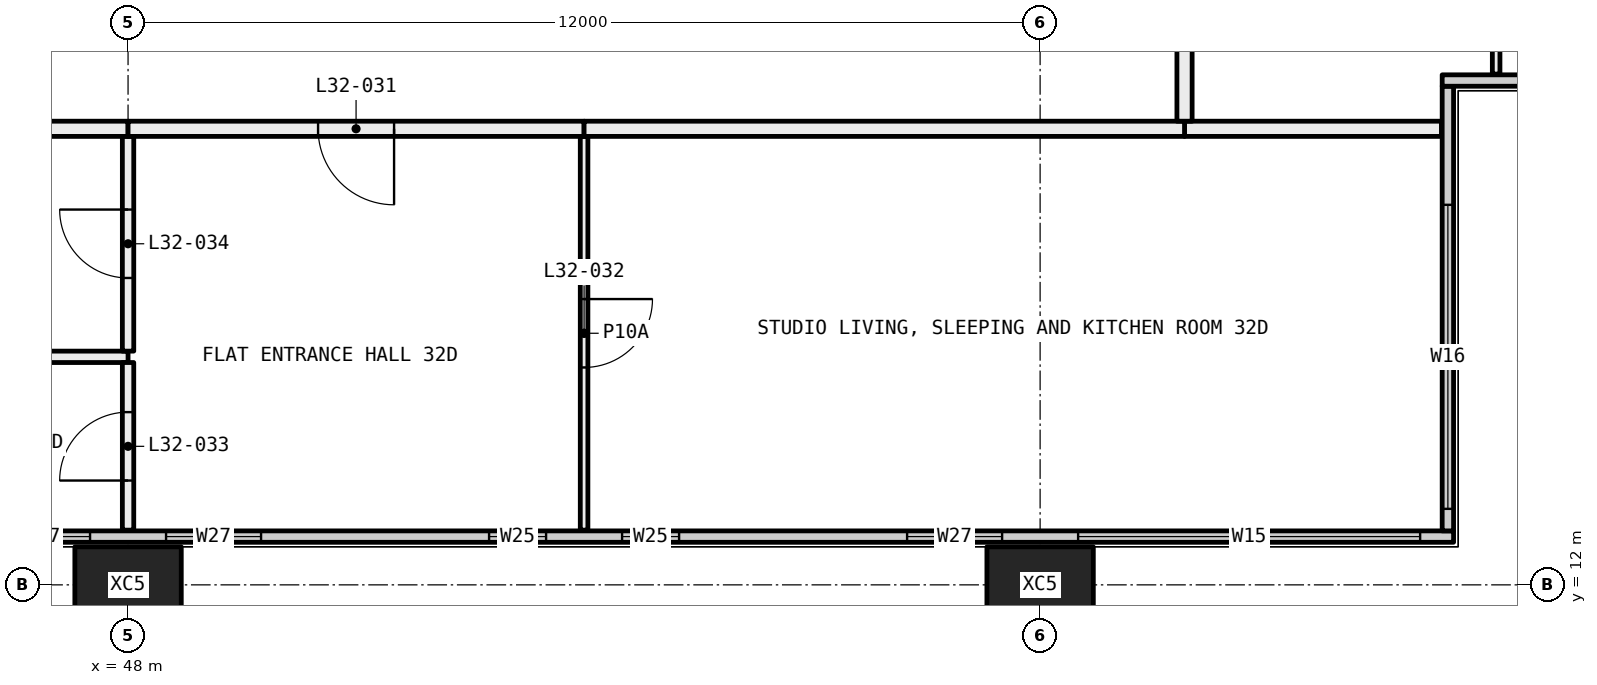
"""IFC4 building model, lengths in metres.
Left out: names, types, materials, properties, quantities, classifications, styles, units other than length and angle.
Written with IfcOpenShell. Run it as: python <this file> out.ifc"""

import sys

from ifc_helpers import new_model, si_unit, direction, frame, frame_2d, origin, origin_2d, place, context, subcontext, project, spatial, rectangle, hollow_rectangle, extrude, element, fill, save


model = new_model("IFC4")
c1 = context("Model", 3, precision=1e-05, world=origin(), true_north=direction((0.0, 1.0)))
c2 = subcontext(c1, "Body", "Model", "MODEL_VIEW")
j1 = project(units=[si_unit("LENGTHUNIT", "METRE"), si_unit("PLANEANGLEUNIT", "RADIAN")], contexts=[c1])
p1 = place(None, origin())
s1 = spatial("IfcSite", under=j1, at=p1, CompositionType="ELEMENT")
p2 = place(p1, origin())
s2 = spatial("IfcBuilding", under=s1, at=p2, CompositionType="ELEMENT")
p3 = place(p2, frame((0.0, 0.0, 124.2)))
s3 = spatial("IfcBuildingStorey", under=s2, at=p3, CompositionType="ELEMENT", Elevation=124.2)
for number, where, z_axis, x_axis in (
    (1, (48.0, 12.0, -0.4), (0.0, 0.0, 1.0), (1.0, 0.0, 0.0)),
    (2, (60.0, 12.0, -0.4), (0.0, 0.0, 1.0), (1.0, 0.0, 0.0)),
):
    element("IfcColumn", number, at=place(p3, frame(where, z_axis=z_axis, x_axis=x_axis)), inside=s3, PredefinedType="COLUMN", context=c2, shape_type="SweptSolid", body=[
        extrude(hollow_rectangle(XDim=1.4, YDim=1.0, WallThickness=0.055, at=origin_2d()), origin(), (0.0, 0.0, 1.0), 3.45),
    ])
p4 = place(p3, frame((6.56, 12.635, 0.0), z_axis=(0.0, 0.0, 1.0), x_axis=(1.0, 0.0, 0.0)))
e3 = element("IfcWall", 3, at=p4, inside=s3, PredefinedType="ELEMENTEDWALL", context=c2, shape_type="SweptSolid", body=[
    extrude(rectangle(XDim=58.88, YDim=0.15, at=frame_2d((29.44, 0.0))), origin(), (0.0, 0.0, 1.0), 3.05),
])
p5 = place(p4, frame((0.44, 0.0, 0.45)))
e4 = element("IfcOpeningElement", 4, at=p5, cuts=e3, PredefinedType="OPENING", context=c2, shape_type="SweptSolid", body=[
    extrude(rectangle(XDim=4.5, YDim=2.55, at=frame_2d((2.25, 1.275))), frame((0.0, 0.085, 0.0), z_axis=(0.0, -1.0, 0.0), x_axis=(1.0, 0.0, 0.0)), (0.0, 0.0, 1.0), 0.17),
])
p6 = place(p4, frame((5.94, 0.0, 0.45)))
e5 = element("IfcOpeningElement", 5, at=p6, cuts=e3, PredefinedType="OPENING", context=c2, shape_type="SweptSolid", body=[
    extrude(rectangle(XDim=1.25, YDim=2.55, at=frame_2d((0.625, 1.275))), frame((0.0, 0.085, 0.0), z_axis=(0.0, -1.0, 0.0), x_axis=(1.0, 0.0, 0.0)), (0.0, 0.0, 1.0), 0.17),
])
p7 = place(p4, frame((10.19, 0.0, 0.45)))
e6 = element("IfcOpeningElement", 6, at=p7, cuts=e3, PredefinedType="OPENING", context=c2, shape_type="SweptSolid", body=[
    extrude(rectangle(XDim=0.75, YDim=2.55, at=frame_2d((0.375, 1.275))), frame((0.0, 0.085, 0.0), z_axis=(0.0, -1.0, 0.0), x_axis=(1.0, 0.0, 0.0)), (0.0, 0.0, 1.0), 0.17),
])
p8 = place(p4, frame((11.94, 0.0, 0.45)))
e7 = element("IfcOpeningElement", 7, at=p8, cuts=e3, PredefinedType="OPENING", context=c2, shape_type="SweptSolid", body=[
    extrude(rectangle(XDim=0.75, YDim=2.55, at=frame_2d((0.375, 1.275))), frame((0.0, 0.085, 0.0), z_axis=(0.0, -1.0, 0.0), x_axis=(1.0, 0.0, 0.0)), (0.0, 0.0, 1.0), 0.17),
])
p9 = place(p4, frame((15.69, 0.0, 0.45)))
e8 = element("IfcOpeningElement", 8, at=p9, cuts=e3, PredefinedType="OPENING", context=c2, shape_type="SweptSolid", body=[
    extrude(rectangle(XDim=1.25, YDim=2.55, at=frame_2d((0.625, 1.275))), frame((0.0, 0.085, 0.0), z_axis=(0.0, -1.0, 0.0), x_axis=(1.0, 0.0, 0.0)), (0.0, 0.0, 1.0), 0.17),
])
p10 = place(p4, frame((17.94, 0.0, 0.45)))
e9 = element("IfcOpeningElement", 9, at=p10, cuts=e3, PredefinedType="OPENING", context=c2, shape_type="SweptSolid", body=[
    extrude(rectangle(XDim=1.25, YDim=2.55, at=frame_2d((0.625, 1.275))), frame((0.0, 0.085, 0.0), z_axis=(0.0, -1.0, 0.0), x_axis=(1.0, 0.0, 0.0)), (0.0, 0.0, 1.0), 0.17),
])
p11 = place(p4, frame((22.19, 0.0, 0.45)))
e10 = element("IfcOpeningElement", 10, at=p11, cuts=e3, PredefinedType="OPENING", context=c2, shape_type="SweptSolid", body=[
    extrude(rectangle(XDim=0.75, YDim=2.55, at=frame_2d((0.375, 1.275))), frame((0.0, 0.085, 0.0), z_axis=(0.0, -1.0, 0.0), x_axis=(1.0, 0.0, 0.0)), (0.0, 0.0, 1.0), 0.17),
])
p12 = place(p4, frame((23.94, 0.0, 0.45)))
e11 = element("IfcOpeningElement", 11, at=p12, cuts=e3, PredefinedType="OPENING", context=c2, shape_type="SweptSolid", body=[
    extrude(rectangle(XDim=0.75, YDim=2.55, at=frame_2d((0.375, 1.275))), frame((0.0, 0.085, 0.0), z_axis=(0.0, -1.0, 0.0), x_axis=(1.0, 0.0, 0.0)), (0.0, 0.0, 1.0), 0.17),
])
p13 = place(p4, frame((27.69, 0.0, 0.45)))
e12 = element("IfcOpeningElement", 12, at=p13, cuts=e3, PredefinedType="OPENING", context=c2, shape_type="SweptSolid", body=[
    extrude(rectangle(XDim=1.25, YDim=2.55, at=frame_2d((0.625, 1.275))), frame((0.0, 0.085, 0.0), z_axis=(0.0, -1.0, 0.0), x_axis=(1.0, 0.0, 0.0)), (0.0, 0.0, 1.0), 0.17),
])
p14 = place(p4, frame((29.94, 0.0, 0.45)))
e13 = element("IfcOpeningElement", 13, at=p14, cuts=e3, PredefinedType="OPENING", context=c2, shape_type="SweptSolid", body=[
    extrude(rectangle(XDim=1.25, YDim=2.55, at=frame_2d((0.625, 1.275))), frame((0.0, 0.085, 0.0), z_axis=(0.0, -1.0, 0.0), x_axis=(1.0, 0.0, 0.0)), (0.0, 0.0, 1.0), 0.17),
])
p15 = place(p4, frame((34.19, 0.0, 0.45)))
e14 = element("IfcOpeningElement", 14, at=p15, cuts=e3, PredefinedType="OPENING", context=c2, shape_type="SweptSolid", body=[
    extrude(rectangle(XDim=0.75, YDim=2.55, at=frame_2d((0.375, 1.275))), frame((0.0, 0.085, 0.0), z_axis=(0.0, -1.0, 0.0), x_axis=(1.0, 0.0, 0.0)), (0.0, 0.0, 1.0), 0.17),
])
p16 = place(p4, frame((35.94, 0.0, 0.45)))
e15 = element("IfcOpeningElement", 15, at=p16, cuts=e3, PredefinedType="OPENING", context=c2, shape_type="SweptSolid", body=[
    extrude(rectangle(XDim=0.75, YDim=2.55, at=frame_2d((0.375, 1.275))), frame((0.0, 0.085, 0.0), z_axis=(0.0, -1.0, 0.0), x_axis=(1.0, 0.0, 0.0)), (0.0, 0.0, 1.0), 0.17),
])
p17 = place(p4, frame((39.69, 0.0, 0.45)))
e16 = element("IfcOpeningElement", 16, at=p17, cuts=e3, PredefinedType="OPENING", context=c2, shape_type="SweptSolid", body=[
    extrude(rectangle(XDim=1.25, YDim=2.55, at=frame_2d((0.625, 1.275))), frame((0.0, 0.085, 0.0), z_axis=(0.0, -1.0, 0.0), x_axis=(1.0, 0.0, 0.0)), (0.0, 0.0, 1.0), 0.17),
])
p18 = place(p4, frame((41.94, 0.0, 0.45)))
e17 = element("IfcOpeningElement", 17, at=p18, cuts=e3, PredefinedType="OPENING", context=c2, shape_type="SweptSolid", body=[
    extrude(rectangle(XDim=1.25, YDim=2.55, at=frame_2d((0.625, 1.275))), frame((0.0, 0.085, 0.0), z_axis=(0.0, -1.0, 0.0), x_axis=(1.0, 0.0, 0.0)), (0.0, 0.0, 1.0), 0.17),
])
p19 = place(p4, frame((46.19, 0.0, 0.45)))
e18 = element("IfcOpeningElement", 18, at=p19, cuts=e3, PredefinedType="OPENING", context=c2, shape_type="SweptSolid", body=[
    extrude(rectangle(XDim=0.75, YDim=2.55, at=frame_2d((0.375, 1.275))), frame((0.0, 0.085, 0.0), z_axis=(0.0, -1.0, 0.0), x_axis=(1.0, 0.0, 0.0)), (0.0, 0.0, 1.0), 0.17),
])
p20 = place(p4, frame((47.94, 0.0, 0.45)))
e19 = element("IfcOpeningElement", 19, at=p20, cuts=e3, PredefinedType="OPENING", context=c2, shape_type="SweptSolid", body=[
    extrude(rectangle(XDim=0.75, YDim=2.55, at=frame_2d((0.375, 1.275))), frame((0.0, 0.085, 0.0), z_axis=(0.0, -1.0, 0.0), x_axis=(1.0, 0.0, 0.0)), (0.0, 0.0, 1.0), 0.17),
])
p21 = place(p4, frame((51.69, 0.0, 0.45)))
e20 = element("IfcOpeningElement", 20, at=p21, cuts=e3, PredefinedType="OPENING", context=c2, shape_type="SweptSolid", body=[
    extrude(rectangle(XDim=1.25, YDim=2.55, at=frame_2d((0.625, 1.275))), frame((0.0, 0.085, 0.0), z_axis=(0.0, -1.0, 0.0), x_axis=(1.0, 0.0, 0.0)), (0.0, 0.0, 1.0), 0.17),
])
p22 = place(p4, frame((53.94, 0.0, 0.45)))
e21 = element("IfcOpeningElement", 21, at=p22, cuts=e3, PredefinedType="OPENING", context=c2, shape_type="SweptSolid", body=[
    extrude(rectangle(XDim=4.5, YDim=2.55, at=frame_2d((2.25, 1.275))), frame((0.0, 0.085, 0.0), z_axis=(0.0, -1.0, 0.0), x_axis=(1.0, 0.0, 0.0)), (0.0, 0.0, 1.0), 0.17),
])
p23 = place(p3, frame((65.365, 12.71, 0.0), z_axis=(0.0, 0.0, 1.0), x_axis=(0.0, 1.0, 0.0)))
e22 = element("IfcWall", 22, at=p23, inside=s3, PredefinedType="ELEMENTEDWALL", context=c2, shape_type="SweptSolid", body=[
    extrude(rectangle(XDim=5.85, YDim=0.15, at=frame_2d((2.925, 0.0))), origin(), (0.0, 0.0, 1.0), 3.05),
])
p24 = place(p23, frame((0.29, 0.0, 0.45)))
e23 = element("IfcOpeningElement", 23, at=p24, cuts=e22, PredefinedType="OPENING", context=c2, shape_type="SweptSolid", body=[
    extrude(rectangle(XDim=4.0, YDim=2.55, at=frame_2d((2.0, 1.275))), frame((0.0, 0.085, 0.0), z_axis=(0.0, -1.0, 0.0), x_axis=(1.0, 0.0, 0.0)), (0.0, 0.0, 1.0), 0.17),
])
p25 = place(p3, frame((65.29, 18.635, 0.0), z_axis=(0.0, 0.0, 1.0), x_axis=(1.0, 0.0, 0.0)))
e24 = element("IfcWall", 24, at=p25, inside=s3, PredefinedType="ELEMENTEDWALL", context=c2, shape_type="SweptSolid", body=[
    extrude(rectangle(XDim=6.15, YDim=0.15, at=frame_2d((3.075, 0.0))), origin(), (0.0, 0.0, 1.0), 3.05),
])
p26 = place(p25, frame((1.71, 0.0, 0.45)))
e25 = element("IfcOpeningElement", 25, at=p26, cuts=e24, PredefinedType="OPENING", context=c2, shape_type="SweptSolid", body=[
    extrude(rectangle(XDim=4.0, YDim=2.55, at=frame_2d((2.0, 1.275))), frame((0.0, 0.085, 0.0), z_axis=(0.0, -1.0, 0.0), x_axis=(1.0, 0.0, 0.0)), (0.0, 0.0, 1.0), 0.17),
])
p27 = place(p3, frame((48.0, 15.0, 0.0), z_axis=(0.0, 0.0, 1.0), x_axis=(-1.0, 0.0, 0.0)))
e26 = element("IfcWall", 26, at=p27, inside=s3, PredefinedType="PARTITIONING", context=c2, shape_type="SweptSolid", body=[
    extrude(rectangle(XDim=5.9, YDim=0.15, at=frame_2d((2.95, 0.0))), origin(), (0.0, 0.0, 1.0), 3.05),
])
p28 = place(p3, frame((48.0, 12.72, 0.0), z_axis=(0.0, 0.0, 1.0), x_axis=(0.0, 1.0, 0.0)))
e27 = element("IfcWall", 27, at=p28, inside=s3, PredefinedType="PARTITIONING", context=c2, shape_type="SweptSolid", body=[
    extrude(rectangle(XDim=2.205, YDim=0.15, at=frame_2d((1.103, 0.0))), origin(), (0.0, 0.0, 1.0), 3.05),
])
p29 = place(p28, frame((0.653, 0.0, 0.0)))
e28 = element("IfcOpeningElement", 28, at=p29, cuts=e27, PredefinedType="OPENING", context=c2, shape_type="SweptSolid", body=[
    extrude(rectangle(XDim=0.9, YDim=2.1, at=frame_2d((0.45, 1.05))), frame((0.0, 0.085, 0.0), z_axis=(0.0, -1.0, 0.0), x_axis=(1.0, 0.0, 0.0)), (0.0, 0.0, 1.0), 0.17),
])
p30 = place(p3, frame((48.0, 15.075, 0.0), z_axis=(0.0, 0.0, 1.0), x_axis=(0.0, 1.0, 0.0)))
e29 = element("IfcWall", 29, at=p30, inside=s3, PredefinedType="PARTITIONING", context=c2, shape_type="SweptSolid", body=[
    extrude(rectangle(XDim=2.825, YDim=0.15, at=frame_2d((1.413, 0.0))), origin(), (0.0, 0.0, 1.0), 3.05),
])
p31 = place(p30, frame((0.962, 0.0, 0.0)))
e30 = element("IfcOpeningElement", 30, at=p31, cuts=e29, PredefinedType="OPENING", context=c2, shape_type="SweptSolid", body=[
    extrude(rectangle(XDim=0.9, YDim=2.1, at=frame_2d((0.45, 1.05))), frame((0.0, 0.085, 0.0), z_axis=(0.0, -1.0, 0.0), x_axis=(1.0, 0.0, 0.0)), (0.0, 0.0, 1.0), 0.17),
])
p32 = place(p3, frame((48.0, 18.0, 0.0), z_axis=(0.0, 0.0, 1.0), x_axis=(-1.0, 0.0, 0.0)))
e31 = element("IfcWall", 31, at=p32, inside=s3, PredefinedType="PARTITIONING", context=c2, shape_type="SweptSolid", body=[
    extrude(rectangle(XDim=1.9, YDim=0.2, at=frame_2d((0.95, 0.0))), origin(), (0.0, 0.0, 1.0), 3.05),
])
p33 = place(p3, frame((54.0, 12.72, 0.0), z_axis=(0.0, 0.0, 1.0), x_axis=(0.0, 1.0, 0.0)))
e32 = element("IfcWall", 32, at=p33, inside=s3, PredefinedType="PARTITIONING", context=c2, shape_type="SweptSolid", body=[
    extrude(rectangle(XDim=5.18, YDim=0.1, at=frame_2d((2.59, 0.0))), origin(), (0.0, 0.0, 1.0), 3.05),
])
p34 = place(p33, frame((2.14, 0.0, 0.0)))
e33 = element("IfcOpeningElement", 33, at=p34, cuts=e32, PredefinedType="OPENING", context=c2, shape_type="SweptSolid", body=[
    extrude(rectangle(XDim=0.9, YDim=2.1, at=frame_2d((0.45, 1.05))), frame((0.0, 0.06, 0.0), z_axis=(0.0, -1.0, 0.0), x_axis=(1.0, 0.0, 0.0)), (0.0, 0.0, 1.0), 0.12),
])
p35 = place(p3, frame((54.0, 18.0, 0.0), z_axis=(0.0, 0.0, 1.0), x_axis=(-1.0, 0.0, 0.0)))
e34 = element("IfcWall", 34, at=p35, inside=s3, PredefinedType="PARTITIONING", context=c2, shape_type="SweptSolid", body=[
    extrude(rectangle(XDim=6.0, YDim=0.2, at=frame_2d((3.0, 0.0))), origin(), (0.0, 0.0, 1.0), 3.05),
])
p36 = place(p35, frame((2.5, 0.0, 0.0)))
e35 = element("IfcOpeningElement", 35, at=p36, cuts=e34, PredefinedType="OPENING", context=c2, shape_type="SweptSolid", body=[
    extrude(rectangle(XDim=1.0, YDim=2.1, at=frame_2d((0.5, 1.05))), frame((0.0, 0.11, 0.0), z_axis=(0.0, -1.0, 0.0), x_axis=(1.0, 0.0, 0.0)), (0.0, 0.0, 1.0), 0.22),
])
p37 = place(p3, frame((65.28, 18.0, 0.0), z_axis=(0.0, 0.0, 1.0), x_axis=(-1.0, 0.0, 0.0)))
e36 = element("IfcWall", 36, at=p37, inside=s3, PredefinedType="PARTITIONING", context=c2, shape_type="SweptSolid", body=[
    extrude(rectangle(XDim=3.38, YDim=0.2, at=frame_2d((1.69, 0.0))), origin(), (0.0, 0.0, 1.0), 3.05),
])
p38 = place(p3, frame((61.9, 18.0, 0.0), z_axis=(0.0, 0.0, 1.0), x_axis=(-1.0, 0.0, 0.0)))
e37 = element("IfcWall", 37, at=p38, inside=s3, PredefinedType="PARTITIONING", context=c2, shape_type="SweptSolid", body=[
    extrude(rectangle(XDim=7.9, YDim=0.2, at=frame_2d((3.95, 0.0))), origin(), (0.0, 0.0, 1.0), 3.05),
])
p39 = place(p3, frame((66.0, 22.5, 0.0), z_axis=(0.0, 0.0, 1.0), x_axis=(0.0, -1.0, 0.0)))
e38 = element("IfcWall", 38, at=p39, inside=s3, PredefinedType="PARTITIONING", context=c2, shape_type="SweptSolid", body=[
    extrude(rectangle(XDim=3.78, YDim=0.1, at=frame_2d((1.89, 0.0))), origin(), (0.0, 0.0, 1.0), 3.05),
])
p40 = place(p3, frame((61.9, 22.5, 0.0), z_axis=(0.0, 0.0, 1.0), x_axis=(0.0, -1.0, 0.0)))
e39 = element("IfcWall", 39, at=p40, inside=s3, PredefinedType="PARTITIONING", context=c2, shape_type="SweptSolid", body=[
    extrude(rectangle(XDim=4.4, YDim=0.2, at=frame_2d((2.2, 0.0))), origin(), (0.0, 0.0, 1.0), 3.05),
])
p41 = place(p17, origin())
e40 = element("IfcWindow", 40, at=p41, inside=s3, PartitioningType="SINGLE_PANEL", PredefinedType="WINDOW", context=c2, shape_type="SweptSolid", body=[
    extrude(rectangle(XDim=1.25, YDim=2.55, at=frame_2d((0.625, 1.275))), frame((0.0, 0.03, 0.0), z_axis=(0.0, -1.0, 0.0), x_axis=(1.0, 0.0, 0.0)), (0.0, 0.0, 1.0), 0.06),
])
fill(e16, e40)
p42 = place(p18, origin())
e41 = element("IfcWindow", 41, at=p42, inside=s3, PartitioningType="SINGLE_PANEL", PredefinedType="WINDOW", context=c2, shape_type="SweptSolid", body=[
    extrude(rectangle(XDim=1.25, YDim=2.55, at=frame_2d((0.625, 1.275))), frame((0.0, 0.03, 0.0), z_axis=(0.0, -1.0, 0.0), x_axis=(1.0, 0.0, 0.0)), (0.0, 0.0, 1.0), 0.06),
])
fill(e17, e41)
p43 = place(p19, origin())
e42 = element("IfcWindow", 42, at=p43, inside=s3, PartitioningType="SINGLE_PANEL", PredefinedType="WINDOW", context=c2, shape_type="SweptSolid", body=[
    extrude(rectangle(XDim=0.75, YDim=2.55, at=frame_2d((0.375, 1.275))), frame((0.0, 0.03, 0.0), z_axis=(0.0, -1.0, 0.0), x_axis=(1.0, 0.0, 0.0)), (0.0, 0.0, 1.0), 0.06),
])
fill(e18, e42)
p44 = place(p20, origin())
e43 = element("IfcWindow", 43, at=p44, inside=s3, PartitioningType="SINGLE_PANEL", PredefinedType="WINDOW", context=c2, shape_type="SweptSolid", body=[
    extrude(rectangle(XDim=0.75, YDim=2.55, at=frame_2d((0.375, 1.275))), frame((0.0, 0.03, 0.0), z_axis=(0.0, -1.0, 0.0), x_axis=(1.0, 0.0, 0.0)), (0.0, 0.0, 1.0), 0.06),
])
fill(e19, e43)
p45 = place(p21, origin())
e44 = element("IfcWindow", 44, at=p45, inside=s3, PartitioningType="SINGLE_PANEL", PredefinedType="WINDOW", context=c2, shape_type="SweptSolid", body=[
    extrude(rectangle(XDim=1.25, YDim=2.55, at=frame_2d((0.625, 1.275))), frame((0.0, 0.03, 0.0), z_axis=(0.0, -1.0, 0.0), x_axis=(1.0, 0.0, 0.0)), (0.0, 0.0, 1.0), 0.06),
])
fill(e20, e44)
p46 = place(p22, origin())
e45 = element("IfcWindow", 45, at=p46, inside=s3, PartitioningType="SINGLE_PANEL", PredefinedType="WINDOW", context=c2, shape_type="SweptSolid", body=[
    extrude(rectangle(XDim=4.5, YDim=2.55, at=frame_2d((2.25, 1.275))), frame((0.0, 0.03, 0.0), z_axis=(0.0, -1.0, 0.0), x_axis=(1.0, 0.0, 0.0)), (0.0, 0.0, 1.0), 0.06),
])
fill(e21, e45)
p47 = place(p24, origin())
e46 = element("IfcWindow", 46, at=p47, inside=s3, PartitioningType="SINGLE_PANEL", PredefinedType="WINDOW", context=c2, shape_type="SweptSolid", body=[
    extrude(rectangle(XDim=4.0, YDim=2.55, at=frame_2d((2.0, 1.275))), frame((0.0, 0.03, 0.0), z_axis=(0.0, -1.0, 0.0), x_axis=(1.0, 0.0, 0.0)), (0.0, 0.0, 1.0), 0.06),
])
fill(e23, e46)
p48 = place(p36, origin())
e47 = element("IfcDoor", 47, at=p48, inside=s3, OperationType="SINGLE_SWING_RIGHT", PredefinedType="DOOR", context=c2, shape_type="SweptSolid", body=[
    extrude(rectangle(XDim=1.0, YDim=2.1, at=frame_2d((0.5, 1.05))), frame((0.0, 0.025, 0.0), z_axis=(0.0, -1.0, 0.0), x_axis=(1.0, 0.0, 0.0)), (0.0, 0.0, 1.0), 0.05),
])
fill(e35, e47)
p49 = place(p34, frame((0.9, 0.0, 0.0), x_axis=(-1.0, 0.0, 0.0)))
e48 = element("IfcDoor", 48, at=p49, inside=s3, OperationType="SINGLE_SWING_RIGHT", PredefinedType="DOOR", context=c2, shape_type="SweptSolid", body=[
    extrude(rectangle(XDim=0.9, YDim=2.1, at=frame_2d((0.45, 1.05))), frame((0.0, 0.025, 0.0), z_axis=(0.0, -1.0, 0.0), x_axis=(1.0, 0.0, 0.0)), (0.0, 0.0, 1.0), 0.05),
])
fill(e33, e48)
p50 = place(p29, origin())
e49 = element("IfcDoor", 49, at=p50, inside=s3, OperationType="SINGLE_SWING_RIGHT", PredefinedType="DOOR", context=c2, shape_type="SweptSolid", body=[
    extrude(rectangle(XDim=0.9, YDim=2.1, at=frame_2d((0.45, 1.05))), frame((0.0, 0.025, 0.0), z_axis=(0.0, -1.0, 0.0), x_axis=(1.0, 0.0, 0.0)), (0.0, 0.0, 1.0), 0.05),
])
fill(e28, e49)
p51 = place(p31, origin())
e50 = element("IfcDoor", 50, at=p51, inside=s3, OperationType="SINGLE_SWING_LEFT", PredefinedType="DOOR", context=c2, shape_type="SweptSolid", body=[
    extrude(rectangle(XDim=0.9, YDim=2.1, at=frame_2d((0.45, 1.05))), frame((0.0, 0.025, 0.0), z_axis=(0.0, -1.0, 0.0), x_axis=(1.0, 0.0, 0.0)), (0.0, 0.0, 1.0), 0.05),
])
fill(e30, e50)
save(model, sys.argv[1])
